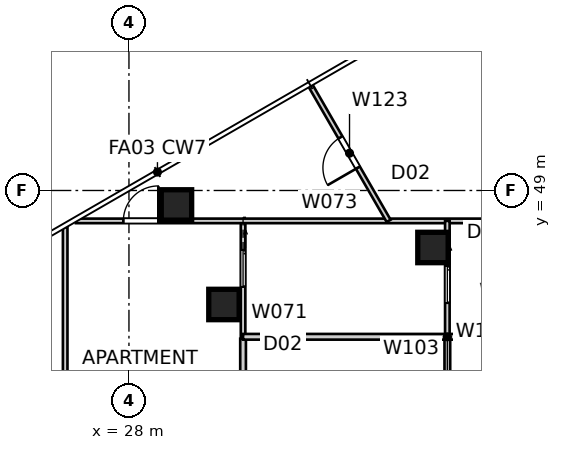
"""IFC4 building model, lengths in metres.
Left out: names, types, materials, properties, quantities, classifications, styles, units other than length and angle.
Written with IfcOpenShell. Run it as: python <this file> out.ifc"""

import sys

from ifc_helpers import new_model, si_unit, direction, frame, frame_2d, origin, origin_2d, place, context, subcontext, project, spatial, rectangle, extrude, element, fill, save


model = new_model("IFC4")
c1 = context("Model", 3, precision=1e-05, world=origin(), true_north=direction((0.0, 1.0)))
c2 = subcontext(c1, "Body", "Model", "MODEL_VIEW")
j1 = project(units=[si_unit("LENGTHUNIT", "METRE"), si_unit("PLANEANGLEUNIT", "RADIAN")], contexts=[c1])
p1 = place(None, origin())
s1 = spatial("IfcSite", under=j1, at=p1, CompositionType="ELEMENT")
p2 = place(p1, origin())
s2 = spatial("IfcBuilding", under=s1, at=p2, CompositionType="ELEMENT")
p3 = place(p2, frame((0.0, 0.0, 232.0)))
s3 = spatial("IfcBuildingStorey", under=s2, at=p3, CompositionType="ELEMENT", Elevation=232.0)
p4 = place(p3, frame((29.25, 48.62, 0.0), z_axis=(0.0, 0.0, 1.0), x_axis=(1.0, 0.0, 0.0)))
e1 = element("IfcColumn", 1, at=p4, inside=s3, PredefinedType="COLUMN", context=c2, shape_type="SweptSolid", body=[
    extrude(rectangle(XDim=0.8, YDim=0.8, at=origin_2d()), origin(), (0.0, 0.0, 1.0), 3.2),
])
for number, where, z_axis, x_axis in (
    (2, (36.0, 47.5, 0.0), (0.0, 0.0, 1.0), (1.0, 0.0, 0.0)),
    (3, (30.5, 46.0, 0.0), (0.0, 0.0, 1.0), (1.0, 0.0, 0.0)),
):
    element("IfcColumn", number, at=place(p3, frame(where, z_axis=z_axis, x_axis=x_axis)), inside=s3, PredefinedType="COLUMN", context=c2, shape_type="SweptSolid", body=[
        extrude(rectangle(XDim=0.8, YDim=0.8, at=origin_2d()), origin(), (0.0, 0.0, 1.0), 3.4),
    ])
p5 = place(p3, frame((26.322, 39.49, 0.0), z_axis=(0.0, 0.0, 1.0), x_axis=(0.0, 1.0, 0.0)))
e4 = element("IfcWall", 4, at=p5, inside=s3, PredefinedType="PARTITIONING", context=c2, shape_type="SweptSolid", body=[
    extrude(rectangle(XDim=8.548, YDim=0.12, at=frame_2d((4.274, 0.0))), origin(), (0.0, 0.0, 1.0), 3.2),
])
p6 = place(p3, frame((31.003, 48.2, 0.0), z_axis=(0.0, 0.0, 1.0), x_axis=(0.0, -1.0, 0.0)))
e5 = element("IfcWall", 5, at=p6, inside=s3, PredefinedType="PARTITIONING", context=c2, shape_type="SweptSolid", body=[
    extrude(rectangle(XDim=3.1, YDim=0.12, at=frame_2d((1.55, 0.0))), origin(), (0.0, 0.0, 1.0), 3.2),
])
p7 = place(p6, frame((0.77, 0.0, 0.0)))
e6 = element("IfcOpeningElement", 6, at=p7, cuts=e5, PredefinedType="OPENING", context=c2, shape_type="SweptSolid", body=[
    extrude(rectangle(XDim=0.96, YDim=2.1, at=frame_2d((0.48, 1.05))), frame((0.0, 0.07, 0.0), z_axis=(0.0, -1.0, 0.0), x_axis=(1.0, 0.0, 0.0)), (0.0, 0.0, 1.0), 0.14),
])
p8 = place(p3, frame((31.003, 45.1, 0.0), z_axis=(0.0, 0.0, 1.0), x_axis=(0.0, -1.0, 0.0)))
e7 = element("IfcWall", 7, at=p8, inside=s3, PredefinedType="SOLIDWALL", context=c2, shape_type="SweptSolid", body=[
    extrude(rectangle(XDim=3.0, YDim=0.15, at=frame_2d((1.5, 0.0))), origin(), (0.0, 0.0, 1.0), 3.2),
])
p9 = place(p8, frame((0.99, 0.0, 0.0)))
e8 = element("IfcOpeningElement", 8, at=p9, cuts=e7, PredefinedType="OPENING", context=c2, shape_type="SweptSolid", body=[
    extrude(rectangle(XDim=0.92, YDim=2.34, at=frame_2d((0.46, 1.17))), frame((0.0, 0.085, 0.0), z_axis=(0.0, -1.0, 0.0), x_axis=(1.0, 0.0, 0.0)), (0.0, 0.0, 1.0), 0.17),
])
p10 = place(p3, frame((26.603, 48.2, 0.0), z_axis=(0.0, 0.0, 1.0), x_axis=(1.0, 0.0, 0.0)))
e9 = element("IfcWall", 9, at=p10, inside=s3, PredefinedType="PARTITIONING", context=c2, shape_type="SweptSolid", body=[
    extrude(rectangle(XDim=17.17, YDim=0.12, at=frame_2d((8.585, 0.0))), origin(), (0.0, 0.0, 1.0), 3.2),
])
p11 = place(p10, frame((1.25, 0.0, 0.0)))
e10 = element("IfcOpeningElement", 10, at=p11, cuts=e9, PredefinedType="OPENING", context=c2, shape_type="SweptSolid", body=[
    extrude(rectangle(XDim=0.92, YDim=2.1, at=frame_2d((0.46, 1.05))), frame((0.0, 0.07, 0.0), z_axis=(0.0, -1.0, 0.0), x_axis=(1.0, 0.0, 0.0)), (0.0, 0.0, 1.0), 0.14),
])
p12 = place(p3, frame((41.753, 45.15, 0.0), z_axis=(0.0, 0.0, 1.0), x_axis=(-1.0, 0.0, 0.0)))
e11 = element("IfcWall", 11, at=p12, inside=s3, PredefinedType="SOLIDWALL", context=c2, shape_type="SweptSolid", body=[
    extrude(rectangle(XDim=10.751, YDim=0.15, at=frame_2d((5.375, 0.0))), origin(), (0.0, 0.0, 1.0), 3.2),
])
p13 = place(p3, frame((36.378, 48.2, 0.0), z_axis=(0.0, 0.0, 1.0), x_axis=(0.0, -1.0, 0.0)))
e12 = element("IfcWall", 12, at=p13, inside=s3, PredefinedType="PARTITIONING", context=c2, shape_type="SweptSolid", body=[
    extrude(rectangle(XDim=3.05, YDim=0.12, at=frame_2d((1.525, 0.0))), origin(), (0.0, 0.0, 1.0), 3.2),
])
p14 = place(p13, frame((1.195, 0.0, 0.0)))
e13 = element("IfcOpeningElement", 13, at=p14, cuts=e12, PredefinedType="OPENING", context=c2, shape_type="SweptSolid", body=[
    extrude(rectangle(XDim=0.96, YDim=2.1, at=frame_2d((0.48, 1.05))), frame((0.0, 0.07, 0.0), z_axis=(0.0, -1.0, 0.0), x_axis=(1.0, 0.0, 0.0)), (0.0, 0.0, 1.0), 0.14),
])
p15 = place(p3, frame((36.378, 45.15, 0.0), z_axis=(0.0, 0.0, 1.0), x_axis=(0.0, -1.0, 0.0)))
e14 = element("IfcWall", 14, at=p15, inside=s3, PredefinedType="SOLIDWALL", context=c2, shape_type="SweptSolid", body=[
    extrude(rectangle(XDim=3.05, YDim=0.15, at=frame_2d((1.525, 0.0))), origin(), (0.0, 0.0, 1.0), 3.2),
])
p16 = place(p15, frame((1.065, 0.0, 0.0)))
e15 = element("IfcOpeningElement", 15, at=p16, cuts=e14, PredefinedType="OPENING", context=c2, shape_type="SweptSolid", body=[
    extrude(rectangle(XDim=0.92, YDim=2.34, at=frame_2d((0.46, 1.17))), frame((0.0, 0.085, 0.0), z_axis=(0.0, -1.0, 0.0), x_axis=(1.0, 0.0, 0.0)), (0.0, 0.0, 1.0), 0.17),
])
p17 = place(p3, frame((40.173, 48.2, 0.0), z_axis=(0.0, 0.0, 1.0), x_axis=(-0.500009005995, 0.866020204108, 0.0)))
e16 = element("IfcWall", 16, at=p17, inside=s3, PredefinedType="PARTITIONING", context=c2, shape_type="SweptSolid", body=[
    extrude(rectangle(XDim=6.785, YDim=0.12, at=frame_2d((3.393, 0.0))), origin(), (0.0, 0.0, 1.0), 3.2),
])
p18 = place(p17, frame((2.952, 0.0, 0.0)))
e17 = element("IfcOpeningElement", 17, at=p18, cuts=e16, PredefinedType="OPENING", context=c2, shape_type="SweptSolid", body=[
    extrude(rectangle(XDim=0.92, YDim=2.34, at=frame_2d((0.46, 1.17))), frame((0.0, 0.07, 0.0), z_axis=(0.0, -1.0, 0.0), x_axis=(1.0, 0.0, 0.0)), (0.0, 0.0, 1.0), 0.14),
])
p19 = place(p3, frame((34.833, 48.2, 0.0), z_axis=(0.0, 0.0, 1.0), x_axis=(-0.499999798456, 0.866025520146, 0.0)))
e18 = element("IfcWall", 18, at=p19, inside=s3, PredefinedType="PARTITIONING", context=c2, shape_type="SweptSolid", body=[
    extrude(rectangle(XDim=4.115, YDim=0.12, at=frame_2d((2.057, 0.0))), origin(), (0.0, 0.0, 1.0), 3.2),
])
p20 = place(p19, frame((1.617, 0.0, 0.0)))
e19 = element("IfcOpeningElement", 19, at=p20, cuts=e18, PredefinedType="OPENING", context=c2, shape_type="SweptSolid", body=[
    extrude(rectangle(XDim=0.92, YDim=2.34, at=frame_2d((0.46, 1.17))), frame((0.0, 0.07, 0.0), z_axis=(0.0, -1.0, 0.0), x_axis=(1.0, 0.0, 0.0)), (0.0, 0.0, 1.0), 0.14),
])
p21 = place(p11, origin())
e20 = element("IfcDoor", 20, at=p21, inside=s3, OperationType="SINGLE_SWING_RIGHT", PredefinedType="DOOR", context=c2, shape_type="SweptSolid", body=[
    extrude(rectangle(XDim=0.92, YDim=2.1, at=frame_2d((0.46, 1.05))), frame((0.0, 0.025, 0.0), z_axis=(0.0, -1.0, 0.0), x_axis=(1.0, 0.0, 0.0)), (0.0, 0.0, 1.0), 0.05),
])
fill(e10, e20)
p22 = place(p7, origin())
e21 = element("IfcDoor", 21, at=p22, inside=s3, OperationType="SLIDING_TO_LEFT", PredefinedType="DOOR", context=c2, shape_type="SweptSolid", body=[
    extrude(rectangle(XDim=0.96, YDim=2.1, at=frame_2d((0.48, 1.05))), frame((0.0, 0.025, 0.0), z_axis=(0.0, -1.0, 0.0), x_axis=(1.0, 0.0, 0.0)), (0.0, 0.0, 1.0), 0.05),
])
fill(e6, e21)
p23 = place(p20, origin())
e22 = element("IfcDoor", 22, at=p23, inside=s3, OperationType="SINGLE_SWING_LEFT", PredefinedType="DOOR", context=c2, shape_type="SweptSolid", body=[
    extrude(rectangle(XDim=0.92, YDim=2.34, at=frame_2d((0.46, 1.17))), frame((0.0, 0.025, 0.0), z_axis=(0.0, -1.0, 0.0), x_axis=(1.0, 0.0, 0.0)), (0.0, 0.0, 1.0), 0.05),
])
fill(e19, e22)
p24 = place(p14, origin())
e23 = element("IfcDoor", 23, at=p24, inside=s3, OperationType="SLIDING_TO_LEFT", PredefinedType="DOOR", context=c2, shape_type="SweptSolid", body=[
    extrude(rectangle(XDim=0.96, YDim=2.1, at=frame_2d((0.48, 1.05))), frame((0.0, 0.025, 0.0), z_axis=(0.0, -1.0, 0.0), x_axis=(1.0, 0.0, 0.0)), (0.0, 0.0, 1.0), 0.05),
])
fill(e13, e23)
save(model, sys.argv[1])
